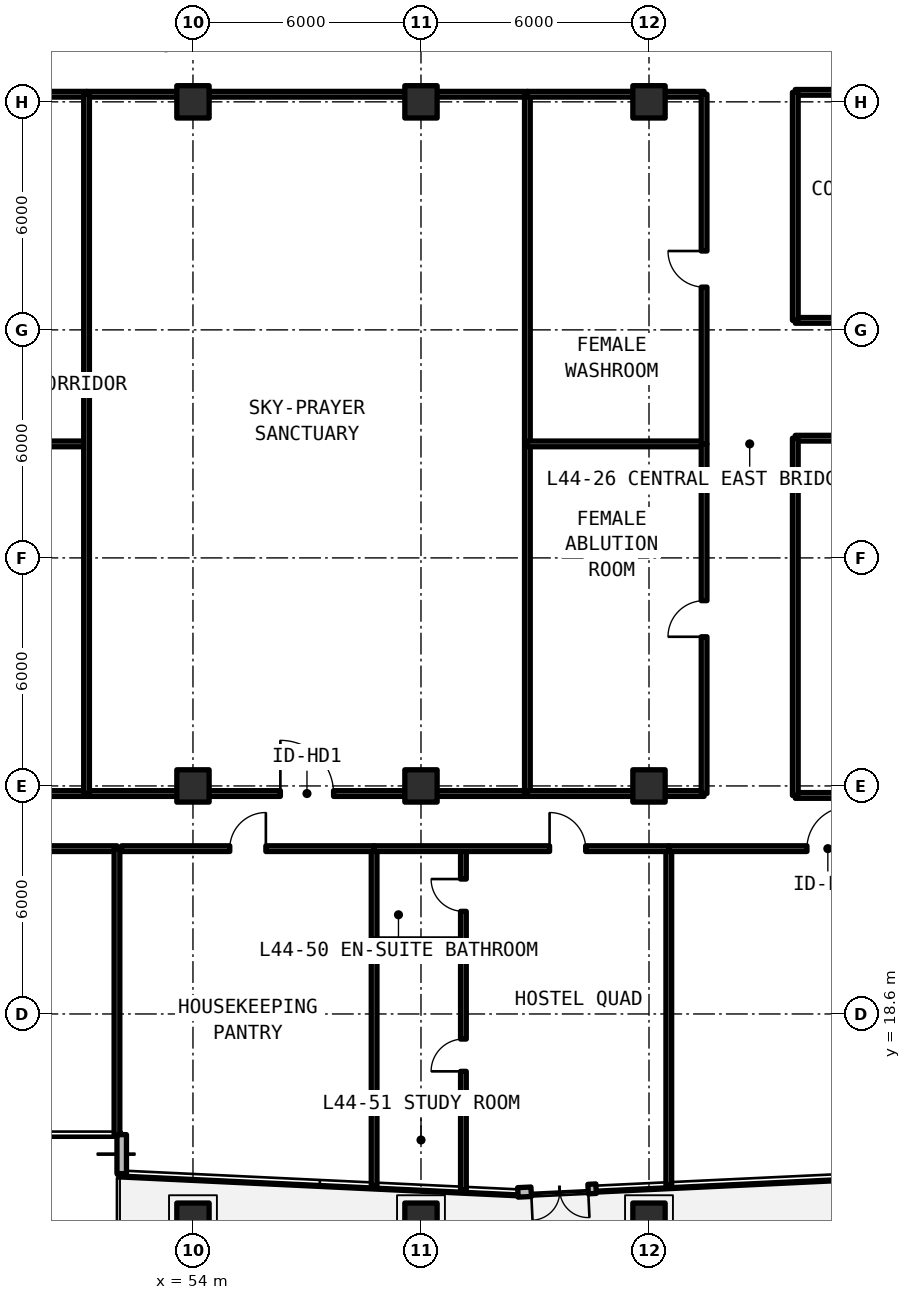
"""IFC4 building model, lengths in metres.
Left out: names, types, materials, properties, quantities, classifications, styles, units other than length and angle.
Written with IfcOpenShell. Run it as: python <this file> out.ifc"""

import sys

from ifc_helpers import new_model, si_unit, direction, frame, frame_2d, origin, origin_2d, place, context, subcontext, project, spatial, rectangle, extrude, element, fill, save


model = new_model("IFC4")
c1 = context("Model", 3, precision=1e-05, world=origin(), true_north=direction((0.0, 1.0)))
c2 = subcontext(c1, "Body", "Model", "MODEL_VIEW")
j1 = project(units=[si_unit("LENGTHUNIT", "METRE"), si_unit("PLANEANGLEUNIT", "RADIAN")], contexts=[c1])
p1 = place(None, origin())
s1 = spatial("IfcSite", under=j1, at=p1, CompositionType="ELEMENT")
p2 = place(p1, origin())
s2 = spatial("IfcBuilding", under=s1, at=p2, CompositionType="ELEMENT")
p3 = place(p2, frame((0.0, 0.0, 158.4)))
s3 = spatial("IfcBuildingStorey", under=s2, at=p3, CompositionType="ELEMENT", Elevation=158.4)
for number, where, z_axis, x_axis in (
    (1, (54.0, 24.6, 0.0), (0.0, 0.0, 1.0), (1.0, 0.0, 0.0)),
    (2, (54.0, 42.6, 0.0), (0.0, 0.0, 1.0), (1.0, 0.0, 0.0)),
    (3, (60.0, 24.6, 0.0), (0.0, 0.0, 1.0), (1.0, 0.0, 0.0)),
    (4, (60.0, 42.6, 0.0), (0.0, 0.0, 1.0), (1.0, 0.0, 0.0)),
    (5, (66.0, 24.6, 0.0), (0.0, 0.0, 1.0), (1.0, 0.0, 0.0)),
    (6, (66.0, 42.6, 0.0), (0.0, 0.0, 1.0), (1.0, 0.0, 0.0)),
    (7, (54.0, 13.2, 0.0), (0.0, 0.0, 1.0), (1.0, 0.0, 0.0)),
    (8, (60.0, 13.2, 0.0), (0.0, 0.0, 1.0), (1.0, 0.0, 0.0)),
    (9, (66.0, 13.2, 0.0), (0.0, 0.0, 1.0), (1.0, 0.0, 0.0)),
):
    element("IfcColumn", number, at=place(p3, frame(where, z_axis=z_axis, x_axis=x_axis)), inside=s3, PredefinedType="COLUMN", context=c2, shape_type="SweptSolid", body=[
        extrude(rectangle(XDim=0.85, YDim=0.85, at=origin_2d()), origin(), (0.0, 0.0, 1.0), 3.63),
    ])
p4 = place(p3, frame((52.125, 15.425, 0.0), z_axis=(0.0, 0.0, 1.0), x_axis=(0.0, -1.0, 0.0)))
e10 = element("IfcWall", 10, at=p4, inside=s3, PredefinedType="SOLIDWALL", context=c2, shape_type="SweptSolid", body=[
    extrude(rectangle(XDim=1.026, YDim=0.25, at=frame_2d((0.513, 0.0))), origin(), (0.0, 0.0, 1.0), 3.41),
])
p5 = place(p3, frame((62.55, 13.905, 0.0), z_axis=(0.0, 0.0, 1.0), x_axis=(0.998875633253, 0.047407481407, 0.0)))
e11 = element("IfcWall", 11, at=p5, inside=s3, PredefinedType="SOLIDWALL", context=c2, shape_type="SweptSolid", body=[
    extrude(rectangle(XDim=2.06, YDim=0.25, at=frame_2d((1.03, 0.0))), origin(), (0.0, 0.0, 1.0), 3.41),
])
p6 = place(p5, frame((0.35, 0.0, 0.0)))
e12 = element("IfcOpeningElement", 12, at=p6, cuts=e11, PredefinedType="OPENING", context=c2, shape_type="SweptSolid", body=[
    extrude(rectangle(XDim=1.5, YDim=2.2, at=frame_2d((0.75, 1.1))), frame((0.0, 0.135, 0.0), z_axis=(0.0, -1.0, 0.0), x_axis=(1.0, 0.0, 0.0)), (0.0, 0.0, 1.0), 0.27),
])
p7 = place(p3, frame((69.85, 24.35, 0.0), z_axis=(0.0, 0.0, 1.0), x_axis=(1.0, 0.0, 0.0)))
e13 = element("IfcWall", 13, at=p7, inside=s3, PredefinedType="SOLIDWALL", context=c2, shape_type="SweptSolid", body=[
    extrude(rectangle(XDim=7.88, YDim=0.15, at=frame_2d((3.94, 0.0))), origin(), (0.0, 0.0, 1.0), 2.63),
])
p8 = place(p3, frame((69.85, 33.75, 0.0), z_axis=(0.0, 0.0, 1.0), x_axis=(1.0, 0.0, 0.0)))
e14 = element("IfcWall", 14, at=p8, inside=s3, PredefinedType="SOLIDWALL", context=c2, shape_type="SweptSolid", body=[
    extrude(rectangle(XDim=7.88, YDim=0.15, at=frame_2d((3.94, 0.0))), origin(), (0.0, 0.0, 1.0), 2.63),
])
p9 = place(p8, frame((3.465, 0.0, 0.0)))
e15 = element("IfcOpeningElement", 15, at=p9, cuts=e14, PredefinedType="OPENING", context=c2, shape_type="SweptSolid", body=[
    extrude(rectangle(XDim=0.95, YDim=2.15, at=frame_2d((0.475, 1.075))), frame((0.0, 0.085, 0.0), z_axis=(0.0, -1.0, 0.0), x_axis=(1.0, 0.0, 0.0)), (0.0, 0.0, 1.0), 0.17),
])
p10 = place(p3, frame((69.85, 24.35, 0.0), z_axis=(0.0, 0.0, 1.0), x_axis=(0.0, 1.0, 0.0)))
e16 = element("IfcWall", 16, at=p10, inside=s3, PredefinedType="SOLIDWALL", context=c2, shape_type="SweptSolid", body=[
    extrude(rectangle(XDim=9.4, YDim=0.15, at=frame_2d((4.7, 0.0))), origin(), (0.0, 0.0, 1.0), 2.63),
])
p11 = place(p3, frame((69.85, 36.85, 0.0), z_axis=(0.0, 0.0, 1.0), x_axis=(1.0, 0.0, 0.0)))
e17 = element("IfcWall", 17, at=p11, inside=s3, PredefinedType="SOLIDWALL", context=c2, shape_type="SweptSolid", body=[
    extrude(rectangle(XDim=7.88, YDim=0.15, at=frame_2d((3.94, 0.0))), origin(), (0.0, 0.0, 1.0), 2.63),
])
p12 = place(p11, frame((3.465, 0.0, 0.0)))
e18 = element("IfcOpeningElement", 18, at=p12, cuts=e17, PredefinedType="OPENING", context=c2, shape_type="SweptSolid", body=[
    extrude(rectangle(XDim=0.95, YDim=2.15, at=frame_2d((0.475, 1.075))), frame((0.0, 0.085, 0.0), z_axis=(0.0, -1.0, 0.0), x_axis=(1.0, 0.0, 0.0)), (0.0, 0.0, 1.0), 0.17),
])
p13 = place(p3, frame((69.85, 42.85, 0.0), z_axis=(0.0, 0.0, 1.0), x_axis=(1.0, 0.0, 0.0)))
e19 = element("IfcWall", 19, at=p13, inside=s3, PredefinedType="SOLIDWALL", context=c2, shape_type="SweptSolid", body=[
    extrude(rectangle(XDim=7.88, YDim=0.15, at=frame_2d((3.94, 0.0))), origin(), (0.0, 0.0, 1.0), 2.63),
])
p14 = place(p3, frame((69.85, 36.85, 0.0), z_axis=(0.0, 0.0, 1.0), x_axis=(0.0, 1.0, 0.0)))
e20 = element("IfcWall", 20, at=p14, inside=s3, PredefinedType="SOLIDWALL", context=c2, shape_type="SweptSolid", body=[
    extrude(rectangle(XDim=6.0, YDim=0.15, at=frame_2d((3.0, 0.0))), origin(), (0.0, 0.0, 1.0), 2.63),
])
for number, where, z_axis, x_axis in (
    (21, (46.55, 24.4, 0.0), (0.0, 0.0, 1.0), (1.0, 0.0, 0.0)),
    (22, (46.55, 33.6, 0.0), (0.0, 0.0, 1.0), (1.0, 0.0, 0.0)),
    (23, (46.55, 42.8, 0.0), (0.0, 0.0, 1.0), (1.0, 0.0, 0.0)),
):
    element("IfcWall", number, at=place(p3, frame(where, z_axis=z_axis, x_axis=x_axis)), inside=s3, PredefinedType="SOLIDWALL", context=c2, shape_type="SweptSolid", body=[
        extrude(rectangle(XDim=4.65, YDim=0.15, at=frame_2d((2.325, 0.0))), origin(), (0.0, 0.0, 1.0), 2.63),
    ])
p15 = place(p3, frame((51.2, 24.4, 0.0), z_axis=(0.0, 0.0, 1.0), x_axis=(1.0, 0.0, 0.0)))
e24 = element("IfcWall", 24, at=p15, inside=s3, PredefinedType="SOLIDWALL", context=c2, shape_type="SweptSolid", body=[
    extrude(rectangle(XDim=11.6, YDim=0.15, at=frame_2d((5.8, 0.0))), origin(), (0.0, 0.0, 1.0), 2.63),
])
p16 = place(p15, frame((5.1, 0.0, 0.0)))
e25 = element("IfcOpeningElement", 25, at=p16, cuts=e24, PredefinedType="OPENING", context=c2, shape_type="SweptSolid", body=[
    extrude(rectangle(XDim=1.4, YDim=2.15, at=frame_2d((0.7, 1.075))), frame((0.0, 0.085, 0.0), z_axis=(0.0, -1.0, 0.0), x_axis=(1.0, 0.0, 0.0)), (0.0, 0.0, 1.0), 0.17),
])
p17 = place(p3, frame((51.2, 42.8, 0.0), z_axis=(0.0, 0.0, 1.0), x_axis=(1.0, 0.0, 0.0)))
e26 = element("IfcWall", 26, at=p17, inside=s3, PredefinedType="SOLIDWALL", context=c2, shape_type="SweptSolid", body=[
    extrude(rectangle(XDim=11.6, YDim=0.15, at=frame_2d((5.8, 0.0))), origin(), (0.0, 0.0, 1.0), 2.63),
])
for number, where, z_axis, x_axis in (
    (27, (51.2, 24.4, 0.0), (0.0, 0.0, 1.0), (0.0, 1.0, 0.0)),
    (28, (62.8, 24.4, 0.0), (0.0, 0.0, 1.0), (0.0, 1.0, 0.0)),
):
    element("IfcWall", number, at=place(p3, frame(where, z_axis=z_axis, x_axis=x_axis)), inside=s3, PredefinedType="SOLIDWALL", context=c2, shape_type="SweptSolid", body=[
        extrude(rectangle(XDim=18.4, YDim=0.15, at=frame_2d((9.2, 0.0))), origin(), (0.0, 0.0, 1.0), 2.63),
    ])
for number, where, z_axis, x_axis in (
    (29, (62.8, 24.4, 0.0), (0.0, 0.0, 1.0), (1.0, 0.0, 0.0)),
    (30, (62.8, 33.6, 0.0), (0.0, 0.0, 1.0), (1.0, 0.0, 0.0)),
):
    element("IfcWall", number, at=place(p3, frame(where, z_axis=z_axis, x_axis=x_axis)), inside=s3, PredefinedType="SOLIDWALL", context=c2, shape_type="SweptSolid", body=[
        extrude(rectangle(XDim=4.65, YDim=0.15, at=frame_2d((2.325, 0.0))), origin(), (0.0, 0.0, 1.0), 2.63),
    ])
p18 = place(p3, frame((67.45, 24.4, 0.0), z_axis=(0.0, 0.0, 1.0), x_axis=(0.0, 1.0, 0.0)))
e31 = element("IfcWall", 31, at=p18, inside=s3, PredefinedType="SOLIDWALL", context=c2, shape_type="SweptSolid", body=[
    extrude(rectangle(XDim=9.2, YDim=0.15, at=frame_2d((4.6, 0.0))), origin(), (0.0, 0.0, 1.0), 2.63),
])
p19 = place(p18, frame((4.125, 0.0, 0.0)))
e32 = element("IfcOpeningElement", 32, at=p19, cuts=e31, PredefinedType="OPENING", context=c2, shape_type="SweptSolid", body=[
    extrude(rectangle(XDim=0.95, YDim=2.15, at=frame_2d((0.475, 1.075))), frame((0.0, 0.085, 0.0), z_axis=(0.0, -1.0, 0.0), x_axis=(1.0, 0.0, 0.0)), (0.0, 0.0, 1.0), 0.17),
])
p20 = place(p3, frame((62.8, 42.8, 0.0), z_axis=(0.0, 0.0, 1.0), x_axis=(1.0, 0.0, 0.0)))
e33 = element("IfcWall", 33, at=p20, inside=s3, PredefinedType="SOLIDWALL", context=c2, shape_type="SweptSolid", body=[
    extrude(rectangle(XDim=4.65, YDim=0.15, at=frame_2d((2.325, 0.0))), origin(), (0.0, 0.0, 1.0), 2.63),
])
p21 = place(p3, frame((67.45, 33.6, 0.0), z_axis=(0.0, 0.0, 1.0), x_axis=(0.0, 1.0, 0.0)))
e34 = element("IfcWall", 34, at=p21, inside=s3, PredefinedType="SOLIDWALL", context=c2, shape_type="SweptSolid", body=[
    extrude(rectangle(XDim=9.2, YDim=0.15, at=frame_2d((4.6, 0.0))), origin(), (0.0, 0.0, 1.0), 2.63),
])
p22 = place(p21, frame((4.125, 0.0, 0.0)))
e35 = element("IfcOpeningElement", 35, at=p22, cuts=e34, PredefinedType="OPENING", context=c2, shape_type="SweptSolid", body=[
    extrude(rectangle(XDim=0.95, YDim=2.15, at=frame_2d((0.475, 1.075))), frame((0.0, 0.085, 0.0), z_axis=(0.0, -1.0, 0.0), x_axis=(1.0, 0.0, 0.0)), (0.0, 0.0, 1.0), 0.17),
])
p23 = place(p3, frame((43.6, 22.95, 0.0), z_axis=(0.0, 0.0, 1.0), x_axis=(1.0, 0.0, 0.0)))
e36 = element("IfcWall", 36, at=p23, inside=s3, PredefinedType="SOLIDWALL", context=c2, shape_type="SweptSolid", body=[
    extrude(rectangle(XDim=8.4, YDim=0.15, at=frame_2d((4.2, 0.0))), origin(), (0.0, 0.0, 1.0), 2.63),
])
p24 = place(p23, frame((2.3, 0.0, 0.0)))
e37 = element("IfcOpeningElement", 37, at=p24, cuts=e36, PredefinedType="OPENING", context=c2, shape_type="SweptSolid", body=[
    extrude(rectangle(XDim=1.1, YDim=2.15, at=frame_2d((0.55, 1.075))), frame((0.0, 0.085, 0.0), z_axis=(0.0, -1.0, 0.0), x_axis=(1.0, 0.0, 0.0)), (0.0, 0.0, 1.0), 0.17),
])
p25 = place(p3, frame((52.0, 15.425, 0.0), z_axis=(0.0, 0.0, 1.0), x_axis=(0.0, 1.0, 0.0)))
e38 = element("IfcWall", 38, at=p25, inside=s3, PredefinedType="SOLIDWALL", context=c2, shape_type="SweptSolid", body=[
    extrude(rectangle(XDim=7.525, YDim=0.15, at=frame_2d((3.762, 0.0))), origin(), (0.0, 0.0, 1.0), 2.63),
])
p26 = place(p3, frame((58.767, 14.084, 0.0), z_axis=(0.0, 0.0, 1.0), x_axis=(0.0, 1.0, 0.0)))
e39 = element("IfcWall", 39, at=p26, inside=s3, PredefinedType="SOLIDWALL", context=c2, shape_type="SweptSolid", body=[
    extrude(rectangle(XDim=8.865, YDim=0.15, at=frame_2d((4.433, 0.0))), origin(), (0.0, 0.0, 1.0), 2.63),
])
p27 = place(p3, frame((52.12, 22.95, 0.0), z_axis=(0.0, 0.0, 1.0), x_axis=(1.0, 0.0, 0.0)))
e40 = element("IfcWall", 40, at=p27, inside=s3, PredefinedType="SOLIDWALL", context=c2, shape_type="SweptSolid", body=[
    extrude(rectangle(XDim=6.646, YDim=0.15, at=frame_2d((3.323, 0.0))), origin(), (0.0, 0.0, 1.0), 2.63),
])
p28 = place(p27, frame((2.848, 0.0, 0.0)))
e41 = element("IfcOpeningElement", 41, at=p28, cuts=e40, PredefinedType="OPENING", context=c2, shape_type="SweptSolid", body=[
    extrude(rectangle(XDim=0.95, YDim=2.15, at=frame_2d((0.475, 1.075))), frame((0.0, 0.085, 0.0), z_axis=(0.0, -1.0, 0.0), x_axis=(1.0, 0.0, 0.0)), (0.0, 0.0, 1.0), 0.17),
])
p29 = place(p3, frame((66.521, 14.093, 0.0), z_axis=(0.0, 0.0, 1.0), x_axis=(0.0, 1.0, 0.0)))
e42 = element("IfcWall", 42, at=p29, inside=s3, PredefinedType="SOLIDWALL", context=c2, shape_type="SweptSolid", body=[
    extrude(rectangle(XDim=8.857, YDim=0.15, at=frame_2d((4.428, 0.0))), origin(), (0.0, 0.0, 1.0), 2.63),
])
p30 = place(p3, frame((58.767, 20.5, 0.0), z_axis=(0.0, 0.0, 1.0), x_axis=(1.0, 0.0, 0.0)))
e43 = element("IfcWall", 43, at=p30, inside=s3, PredefinedType="PARTITIONING", context=c2, shape_type="SweptSolid", body=[
    extrude(rectangle(XDim=2.35, YDim=0.15, at=frame_2d((1.175, 0.0))), origin(), (0.0, 0.0, 1.0), 2.63),
])
p31 = place(p3, frame((61.117, 13.973, 0.0), z_axis=(0.0, 0.0, 1.0), x_axis=(0.0, 1.0, 0.0)))
e44 = element("IfcWall", 44, at=p31, inside=s3, PredefinedType="PARTITIONING", context=c2, shape_type="SweptSolid", body=[
    extrude(rectangle(XDim=8.977, YDim=0.15, at=frame_2d((4.489, 0.0))), origin(), (0.0, 0.0, 1.0), 2.63),
])
p32 = place(p31, frame((3.117, 0.0, 0.0)))
e45 = element("IfcOpeningElement", 45, at=p32, cuts=e44, PredefinedType="OPENING", context=c2, shape_type="SweptSolid", body=[
    extrude(rectangle(XDim=0.85, YDim=2.1, at=frame_2d((0.425, 1.05))), frame((0.0, 0.085, 0.0), z_axis=(0.0, -1.0, 0.0), x_axis=(1.0, 0.0, 0.0)), (0.0, 0.0, 1.0), 0.17),
])
p33 = place(p31, frame((7.327, 0.0, 0.0)))
e46 = element("IfcOpeningElement", 46, at=p33, cuts=e44, PredefinedType="OPENING", context=c2, shape_type="SweptSolid", body=[
    extrude(rectangle(XDim=0.85, YDim=2.1, at=frame_2d((0.425, 1.05))), frame((0.0, 0.085, 0.0), z_axis=(0.0, -1.0, 0.0), x_axis=(1.0, 0.0, 0.0)), (0.0, 0.0, 1.0), 0.17),
])
p34 = place(p3, frame((58.767, 22.95, 0.0), z_axis=(0.0, 0.0, 1.0), x_axis=(1.0, 0.0, 0.0)))
e47 = element("IfcWall", 47, at=p34, inside=s3, PredefinedType="SOLIDWALL", context=c2, shape_type="SweptSolid", body=[
    extrude(rectangle(XDim=7.754, YDim=0.15, at=frame_2d((3.877, 0.0))), origin(), (0.0, 0.0, 1.0), 2.63),
])
p35 = place(p34, frame((4.617, 0.0, 0.0)))
e48 = element("IfcOpeningElement", 48, at=p35, cuts=e47, PredefinedType="OPENING", context=c2, shape_type="SweptSolid", body=[
    extrude(rectangle(XDim=0.95, YDim=2.15, at=frame_2d((0.475, 1.075))), frame((0.0, 0.085, 0.0), z_axis=(0.0, -1.0, 0.0), x_axis=(1.0, 0.0, 0.0)), (0.0, 0.0, 1.0), 0.17),
])
p36 = place(p3, frame((66.521, 22.95, 0.0), z_axis=(0.0, 0.0, 1.0), x_axis=(1.0, 0.0, 0.0)))
e49 = element("IfcWall", 49, at=p36, inside=s3, PredefinedType="SOLIDWALL", context=c2, shape_type="SweptSolid", body=[
    extrude(rectangle(XDim=9.97, YDim=0.15, at=frame_2d((4.985, 0.0))), origin(), (0.0, 0.0, 1.0), 2.63),
])
p37 = place(p36, frame((3.635, 0.0, 0.0)))
e50 = element("IfcOpeningElement", 50, at=p37, cuts=e49, PredefinedType="OPENING", context=c2, shape_type="SweptSolid", body=[
    extrude(rectangle(XDim=1.1, YDim=2.15, at=frame_2d((0.55, 1.075))), frame((0.0, 0.085, 0.0), z_axis=(0.0, -1.0, 0.0), x_axis=(1.0, 0.0, 0.0)), (0.0, 0.0, 1.0), 0.17),
])
p38 = place(p6, frame((1.5, 0.0, 0.0), z_axis=(0.0, 0.0, 1.0), x_axis=(-1.0, 0.0, 0.0)))
e51 = element("IfcDoor", 51, at=p38, inside=s3, OperationType="SINGLE_SWING_LEFT", PredefinedType="DOOR", context=c2, shape_type="SweptSolid", body=[
    extrude(rectangle(XDim=1.5, YDim=2.2, at=frame_2d((0.75, 1.1))), frame((0.0, 0.025, 0.0), z_axis=(0.0, -1.0, 0.0), x_axis=(1.0, 0.0, 0.0)), (0.0, 0.0, 1.0), 0.05),
])
fill(e12, e51)
p39 = place(p16, origin())
e52 = element("IfcDoor", 52, at=p39, inside=s3, OperationType="SINGLE_SWING_RIGHT", PredefinedType="DOOR", context=c2, shape_type="SweptSolid", body=[
    extrude(rectangle(XDim=1.4, YDim=2.15, at=frame_2d((0.7, 1.075))), frame((0.0, 0.025, 0.0), z_axis=(0.0, -1.0, 0.0), x_axis=(1.0, 0.0, 0.0)), (0.0, 0.0, 1.0), 0.05),
])
fill(e25, e52)
p40 = place(p19, origin())
e53 = element("IfcDoor", 53, at=p40, inside=s3, OperationType="SINGLE_SWING_LEFT", PredefinedType="DOOR", context=c2, shape_type="SweptSolid", body=[
    extrude(rectangle(XDim=0.95, YDim=2.15, at=frame_2d((0.475, 1.075))), frame((0.0, 0.025, 0.0), z_axis=(0.0, -1.0, 0.0), x_axis=(1.0, 0.0, 0.0)), (0.0, 0.0, 1.0), 0.05),
])
fill(e32, e53)
p41 = place(p22, origin())
e54 = element("IfcDoor", 54, at=p41, inside=s3, OperationType="SINGLE_SWING_RIGHT", PredefinedType="DOOR", context=c2, shape_type="SweptSolid", body=[
    extrude(rectangle(XDim=0.95, YDim=2.15, at=frame_2d((0.475, 1.075))), frame((0.0, 0.025, 0.0), z_axis=(0.0, -1.0, 0.0), x_axis=(1.0, 0.0, 0.0)), (0.0, 0.0, 1.0), 0.05),
])
fill(e35, e54)
p42 = place(p28, origin())
e55 = element("IfcDoor", 55, at=p42, inside=s3, OperationType="SINGLE_SWING_RIGHT", PredefinedType="DOOR", context=c2, shape_type="SweptSolid", body=[
    extrude(rectangle(XDim=0.95, YDim=2.15, at=frame_2d((0.475, 1.075))), frame((0.0, 0.025, 0.0), z_axis=(0.0, -1.0, 0.0), x_axis=(1.0, 0.0, 0.0)), (0.0, 0.0, 1.0), 0.05),
])
fill(e41, e55)
p43 = place(p32, origin())
e56 = element("IfcDoor", 56, at=p43, inside=s3, OperationType="SINGLE_SWING_LEFT", PredefinedType="DOOR", context=c2, shape_type="SweptSolid", body=[
    extrude(rectangle(XDim=0.85, YDim=2.1, at=frame_2d((0.425, 1.05))), frame((0.0, 0.025, 0.0), z_axis=(0.0, -1.0, 0.0), x_axis=(1.0, 0.0, 0.0)), (0.0, 0.0, 1.0), 0.05),
])
fill(e45, e56)
p44 = place(p33, origin())
e57 = element("IfcDoor", 57, at=p44, inside=s3, OperationType="SINGLE_SWING_RIGHT", PredefinedType="DOOR", context=c2, shape_type="SweptSolid", body=[
    extrude(rectangle(XDim=0.85, YDim=2.1, at=frame_2d((0.425, 1.05))), frame((0.0, 0.025, 0.0), z_axis=(0.0, -1.0, 0.0), x_axis=(1.0, 0.0, 0.0)), (0.0, 0.0, 1.0), 0.05),
])
fill(e46, e57)
p45 = place(p35, origin())
e58 = element("IfcDoor", 58, at=p45, inside=s3, OperationType="SINGLE_SWING_LEFT", PredefinedType="DOOR", context=c2, shape_type="SweptSolid", body=[
    extrude(rectangle(XDim=0.95, YDim=2.15, at=frame_2d((0.475, 1.075))), frame((0.0, 0.025, 0.0), z_axis=(0.0, -1.0, 0.0), x_axis=(1.0, 0.0, 0.0)), (0.0, 0.0, 1.0), 0.05),
])
fill(e48, e58)
p46 = place(p37, origin())
e59 = element("IfcDoor", 59, at=p46, inside=s3, OperationType="SINGLE_SWING_RIGHT", PredefinedType="DOOR", context=c2, shape_type="SweptSolid", body=[
    extrude(rectangle(XDim=1.1, YDim=2.15, at=frame_2d((0.55, 1.075))), frame((0.0, 0.025, 0.0), z_axis=(0.0, -1.0, 0.0), x_axis=(1.0, 0.0, 0.0)), (0.0, 0.0, 1.0), 0.05),
])
fill(e50, e59)
save(model, sys.argv[1])
